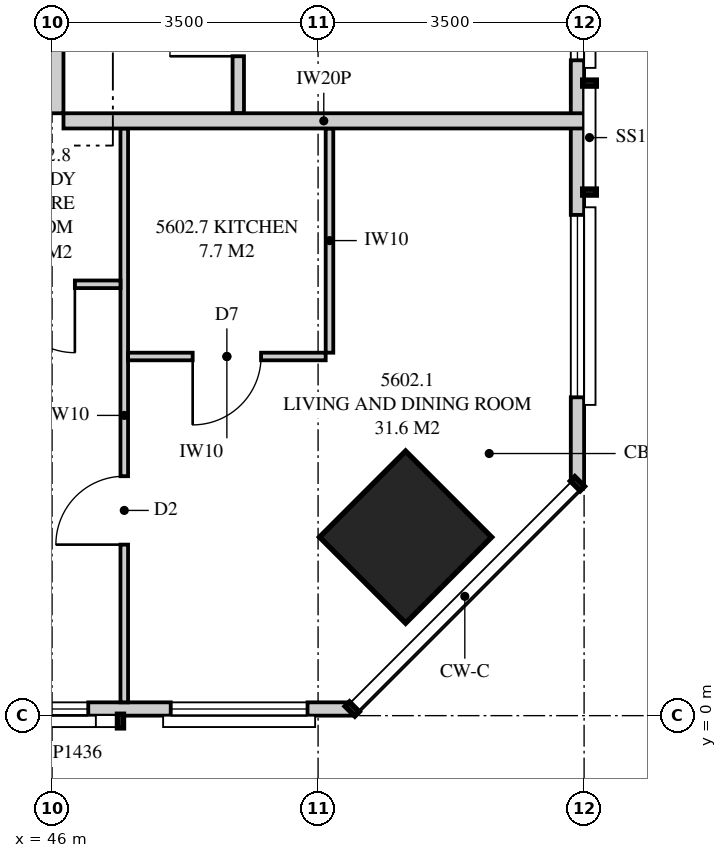
"""IFC4 building model, lengths in metres.
Left out: names, types, materials, properties, quantities, classifications, styles, units other than length and angle.
Written with IfcOpenShell. Run it as: python <this file> out.ifc"""

import sys

from ifc_helpers import new_model, si_unit, direction, frame, frame_2d, origin, origin_2d, place, context, subcontext, project, spatial, polyline, rectangle, hollow_rectangle, outline, extrude, element, fill, save


model = new_model("IFC4")
c1 = context("Model", 3, precision=1e-05, world=origin(), true_north=direction((0.0, 1.0)))
c2 = subcontext(c1, "Body", "Model", "MODEL_VIEW")
j1 = project(units=[si_unit("LENGTHUNIT", "METRE"), si_unit("PLANEANGLEUNIT", "RADIAN")], contexts=[c1])
p1 = place(None, origin())
s1 = spatial("IfcSite", under=j1, at=p1, CompositionType="ELEMENT")
p2 = place(p1, origin())
s2 = spatial("IfcBuilding", under=s1, at=p2, CompositionType="ELEMENT")
p3 = place(p2, frame((0.0, 0.0, 204.6)))
s3 = spatial("IfcBuildingStorey", under=s2, at=p3, CompositionType="ELEMENT", Elevation=204.6)
p4 = place(p3, frame((50.652, 2.348, 0.0), z_axis=(0.0, 0.0, 1.0), x_axis=(-0.707106781187, 0.707106781187, 0.0)))
e1 = element("IfcColumn", 1, at=p4, inside=s3, PredefinedType="COLUMN", context=c2, shape_type="SweptSolid", body=[
    extrude(hollow_rectangle(XDim=1.6, YDim=1.6, WallThickness=0.125, at=origin_2d()), origin(), (0.0, 0.0, 1.0), 3.35),
])
p5 = place(p3, frame((15.051, 0.087, 0.0), z_axis=(0.0, 0.0, 1.0), x_axis=(1.0, 0.0, 0.0)))
e2 = element("IfcWall", 2, at=p5, inside=s3, PredefinedType="SOLIDWALL", context=c2, shape_type="SweptSolid", body=[
    extrude(rectangle(XDim=34.897, YDim=0.175, at=frame_2d((17.449, 0.0))), origin(), (0.0, 0.0, 1.0), 3.07),
])
p6 = place(p5, frame((0.699, 0.0, 0.4)))
e3 = element("IfcOpeningElement", 3, at=p6, cuts=e2, PredefinedType="OPENING", context=c2, shape_type="SweptSolid", body=[
    extrude(rectangle(XDim=1.8, YDim=1.7, at=frame_2d((0.9, 0.85))), frame((0.0, 0.097, 0.0), z_axis=(0.0, -1.0, 0.0), x_axis=(1.0, 0.0, 0.0)), (0.0, 0.0, 1.0), 0.195),
])
p7 = place(p5, frame((9.274, 0.0, 0.4)))
e4 = element("IfcOpeningElement", 4, at=p7, cuts=e2, PredefinedType="OPENING", context=c2, shape_type="SweptSolid", body=[
    extrude(rectangle(XDim=2.4, YDim=1.7, at=frame_2d((1.2, 0.85))), frame((0.0, 0.097, 0.0), z_axis=(0.0, -1.0, 0.0), x_axis=(1.0, 0.0, 0.0)), (0.0, 0.0, 1.0), 0.195),
])
p8 = place(p5, frame((13.561, 0.0, 0.0)))
e5 = element("IfcOpeningElement", 5, at=p8, cuts=e2, PredefinedType="OPENING", context=c2, shape_type="SweptSolid", body=[
    extrude(rectangle(XDim=1.8, YDim=2.1, at=frame_2d((0.9, 1.05))), frame((0.0, 0.097, 0.0), z_axis=(0.0, -1.0, 0.0), x_axis=(1.0, 0.0, 0.0)), (0.0, 0.0, 1.0), 0.195),
])
p9 = place(p5, frame((20.049, 0.0, 0.4)))
e6 = element("IfcOpeningElement", 6, at=p9, cuts=e2, PredefinedType="OPENING", context=c2, shape_type="SweptSolid", body=[
    extrude(rectangle(XDim=1.8, YDim=1.7, at=frame_2d((0.9, 0.85))), frame((0.0, 0.097, 0.0), z_axis=(0.0, -1.0, 0.0), x_axis=(1.0, 0.0, 0.0)), (0.0, 0.0, 1.0), 0.195),
])
p10 = place(p5, frame((23.649, 0.0, 0.4)))
e7 = element("IfcOpeningElement", 7, at=p10, cuts=e2, PredefinedType="OPENING", context=c2, shape_type="SweptSolid", body=[
    extrude(rectangle(XDim=1.8, YDim=1.7, at=frame_2d((0.9, 0.85))), frame((0.0, 0.097, 0.0), z_axis=(0.0, -1.0, 0.0), x_axis=(1.0, 0.0, 0.0)), (0.0, 0.0, 1.0), 0.195),
])
p11 = place(p5, frame((29.625, 0.0, 0.4)))
e8 = element("IfcOpeningElement", 8, at=p11, cuts=e2, PredefinedType="OPENING", context=c2, shape_type="SweptSolid", body=[
    extrude(rectangle(XDim=1.8, YDim=1.7, at=frame_2d((0.9, 0.85))), frame((0.0, 0.097, 0.0), z_axis=(0.0, -1.0, 0.0), x_axis=(1.0, 0.0, 0.0)), (0.0, 0.0, 1.0), 0.195),
])
p12 = place(p5, frame((32.51, 0.0, 0.4)))
e9 = element("IfcOpeningElement", 9, at=p12, cuts=e2, PredefinedType="OPENING", context=c2, shape_type="SweptSolid", body=[
    extrude(rectangle(XDim=1.8, YDim=1.7, at=frame_2d((0.9, 0.85))), frame((0.0, 0.097, 0.0), z_axis=(0.0, -1.0, 0.0), x_axis=(1.0, 0.0, 0.0)), (0.0, 0.0, 1.0), 0.195),
])
p13 = place(p3, frame((52.913, 3.051, 0.0), z_axis=(0.0, 0.0, 1.0), x_axis=(0.0, 1.0, 0.0)))
e10 = element("IfcWall", 10, at=p13, inside=s3, PredefinedType="SOLIDWALL", context=c2, shape_type="SweptSolid", body=[
    extrude(outline(polyline([(0.0, 0.0), (29.897, 0.0), (29.897, 3.07), (19.763, 3.07), (19.763, 3.01), (19.617, 3.07), (0.0, 3.07), (0.0, 0.0)])), frame((0.0, 0.087, 0.0), z_axis=(0.0, -1.0, 0.0), x_axis=(1.0, 0.0, 0.0)), (0.0, 0.0, 1.0), 0.175),
])
p14 = place(p13, frame((1.137, 0.0, 0.4)))
e11 = element("IfcOpeningElement", 11, at=p14, cuts=e10, PredefinedType="OPENING", context=c2, shape_type="SweptSolid", body=[
    extrude(rectangle(XDim=2.4, YDim=1.7, at=frame_2d((1.2, 0.85))), frame((0.0, 0.097, 0.0), z_axis=(0.0, -1.0, 0.0), x_axis=(1.0, 0.0, 0.0)), (0.0, 0.0, 1.0), 0.195),
])
p15 = place(p13, frame((5.571, 0.0, 0.4)))
e12 = element("IfcOpeningElement", 12, at=p15, cuts=e10, PredefinedType="OPENING", context=c2, shape_type="SweptSolid", body=[
    extrude(rectangle(XDim=2.4, YDim=1.7, at=frame_2d((1.2, 0.85))), frame((0.0, 0.097, 0.0), z_axis=(0.0, -1.0, 0.0), x_axis=(1.0, 0.0, 0.0)), (0.0, 0.0, 1.0), 0.195),
])
p16 = place(p13, frame((11.879, 0.0, 0.4)))
e13 = element("IfcOpeningElement", 13, at=p16, cuts=e10, PredefinedType="OPENING", context=c2, shape_type="SweptSolid", body=[
    extrude(rectangle(XDim=1.8, YDim=1.7, at=frame_2d((0.9, 0.85))), frame((0.0, 0.097, 0.0), z_axis=(0.0, -1.0, 0.0), x_axis=(1.0, 0.0, 0.0)), (0.0, 0.0, 1.0), 0.195),
])
p17 = place(p13, frame((15.324, 0.0, 0.0)))
e14 = element("IfcOpeningElement", 14, at=p17, cuts=e10, PredefinedType="OPENING", context=c2, shape_type="SweptSolid", body=[
    extrude(rectangle(XDim=1.8, YDim=2.1, at=frame_2d((0.9, 1.05))), frame((0.0, 0.097, 0.0), z_axis=(0.0, -1.0, 0.0), x_axis=(1.0, 0.0, 0.0)), (0.0, 0.0, 1.0), 0.195),
])
p18 = place(p13, frame((18.224, 0.0, 0.4)))
e15 = element("IfcOpeningElement", 15, at=p18, cuts=e10, PredefinedType="OPENING", context=c2, shape_type="SweptSolid", body=[
    extrude(rectangle(XDim=1.8, YDim=1.7, at=frame_2d((0.9, 0.85))), frame((0.0, 0.097, 0.0), z_axis=(0.0, -1.0, 0.0), x_axis=(1.0, 0.0, 0.0)), (0.0, 0.0, 1.0), 0.195),
])
p19 = place(p13, frame((27.461, 0.0, 0.4)))
e16 = element("IfcOpeningElement", 16, at=p19, cuts=e10, PredefinedType="OPENING", context=c2, shape_type="SweptSolid", body=[
    extrude(rectangle(XDim=1.2, YDim=1.7, at=frame_2d((0.6, 0.85))), frame((0.0, 0.097, 0.0), z_axis=(0.0, -1.0, 0.0), x_axis=(1.0, 0.0, 0.0)), (0.0, 0.0, 1.0), 0.195),
])
p20 = place(p3, frame((46.95, 0.175, 0.0), z_axis=(0.0, 0.0, 1.0), x_axis=(0.0, 1.0, 0.0)))
e17 = element("IfcWall", 17, at=p20, inside=s3, PredefinedType="PARTITIONING", context=c2, shape_type="SweptSolid", body=[
    extrude(outline(polyline([(0.0, 0.0), (7.55, 0.0), (7.55, 3.07), (2.035, 3.07), (2.035, 2.07), (1.002, 2.07), (1.002, 3.07), (0.0, 3.07), (0.0, 0.0)])), frame((0.0, 0.05, 0.0), z_axis=(0.0, -1.0, 0.0), x_axis=(1.0, 0.0, 0.0)), (0.0, 0.0, 1.0), 0.1),
])
p21 = place(p20, frame((2.075, 0.0, 0.0)))
e18 = element("IfcOpeningElement", 18, at=p21, cuts=e17, PredefinedType="OPENING", context=c2, shape_type="SweptSolid", body=[
    extrude(rectangle(XDim=0.9, YDim=2.1, at=frame_2d((0.45, 1.05))), frame((0.0, 0.06, 0.0), z_axis=(0.0, -1.0, 0.0), x_axis=(1.0, 0.0, 0.0)), (0.0, 0.0, 1.0), 0.12),
])
p22 = place(p3, frame((47.0, 4.725, 0.0), z_axis=(0.0, 0.0, 1.0), x_axis=(1.0, 0.0, 0.0)))
e19 = element("IfcWall", 19, at=p22, inside=s3, PredefinedType="PARTITIONING", context=c2, shape_type="SweptSolid", body=[
    extrude(rectangle(XDim=2.6, YDim=0.1, at=frame_2d((1.3, 0.0))), origin(), (0.0, 0.0, 1.0), 3.07),
])
p23 = place(p22, frame((0.85, 0.0, 0.0)))
e20 = element("IfcOpeningElement", 20, at=p23, cuts=e19, PredefinedType="OPENING", context=c2, shape_type="SweptSolid", body=[
    extrude(rectangle(XDim=0.9, YDim=2.1, at=frame_2d((0.45, 1.05))), frame((0.0, 0.06, 0.0), z_axis=(0.0, -1.0, 0.0), x_axis=(1.0, 0.0, 0.0)), (0.0, 0.0, 1.0), 0.12),
])
p24 = place(p3, frame((49.65, 4.775, 0.0), z_axis=(0.0, 0.0, 1.0), x_axis=(0.0, 1.0, 0.0)))
e21 = element("IfcWall", 21, at=p24, inside=s3, PredefinedType="PARTITIONING", context=c2, shape_type="SweptSolid", body=[
    extrude(rectangle(XDim=2.95, YDim=0.1, at=frame_2d((1.475, 0.0))), origin(), (0.0, 0.0, 1.0), 3.07),
])
p25 = place(p3, frame((46.15, 7.825, 0.0), z_axis=(0.0, 0.0, 1.0), x_axis=(1.0, 0.0, 0.0)))
e22 = element("IfcWall", 22, at=p25, inside=s3, PredefinedType="PARTITIONING", context=c2, shape_type="SweptSolid", body=[
    extrude(outline(polyline([(0.0, 0.0), (6.85, 0.0), (6.85, 3.07), (5.738, 3.07), (5.738, 2.07), (4.703, 2.07), (4.703, 3.07), (0.0, 3.07), (0.0, 0.0)])), frame((0.0, 0.1, 0.0), z_axis=(0.0, -1.0, 0.0), x_axis=(1.0, 0.0, 0.0)), (0.0, 0.0, 1.0), 0.2),
])
p26 = place(p3, frame((46.05, 7.925, 0.0), z_axis=(0.0, 0.0, 1.0), x_axis=(0.0, 1.0, 0.0)))
e23 = element("IfcWall", 23, at=p26, inside=s3, PredefinedType="PARTITIONING", context=c2, shape_type="SweptSolid", body=[
    extrude(outline(polyline([(0.0, 0.0), (5.875, 0.0), (5.875, 3.07), (5.287, 3.07), (5.287, 2.595), (4.863, 2.595), (4.863, 3.07), (0.0, 3.07), (0.0, 0.0)])), frame((0.0, 0.1, 0.0), z_axis=(0.0, -1.0, 0.0), x_axis=(1.0, 0.0, 0.0)), (0.0, 0.0, 1.0), 0.2),
])
p27 = place(p26, frame((2.438, 0.0, 0.0)))
e24 = element("IfcOpeningElement", 24, at=p27, cuts=e23, PredefinedType="OPENING", context=c2, shape_type="SweptSolid", body=[
    extrude(rectangle(XDim=1.05, YDim=2.2, at=frame_2d((0.525, 1.1))), frame((0.0, 0.11, 0.0), z_axis=(0.0, -1.0, 0.0), x_axis=(1.0, 0.0, 0.0)), (0.0, 0.0, 1.0), 0.22),
])
p28 = place(p3, frame((48.45, 7.925, 0.0), z_axis=(0.0, 0.0, 1.0), x_axis=(0.0, 1.0, 0.0)))
e25 = element("IfcWall", 25, at=p28, inside=s3, PredefinedType="PLUMBINGWALL", context=c2, shape_type="SweptSolid", body=[
    extrude(rectangle(XDim=2.425, YDim=0.15, at=frame_2d((1.212, 0.0))), origin(), (0.0, 0.0, 1.0), 3.07),
])
p29 = place(p28, frame((0.75, 0.0, 0.0)))
e26 = element("IfcOpeningElement", 26, at=p29, cuts=e25, PredefinedType="OPENING", context=c2, shape_type="SweptSolid", body=[
    extrude(rectangle(XDim=0.9, YDim=2.1, at=frame_2d((0.45, 1.05))), frame((0.0, 0.085, 0.0), z_axis=(0.0, -1.0, 0.0), x_axis=(1.0, 0.0, 0.0)), (0.0, 0.0, 1.0), 0.17),
])
p30 = place(p3, frame((46.9, 5.675, 0.0), z_axis=(0.0, 0.0, 1.0), x_axis=(-1.0, 0.0, 0.0)))
e27 = element("IfcWall", 27, at=p30, inside=s3, PredefinedType="PARTITIONING", context=c2, shape_type="SweptSolid", body=[
    extrude(rectangle(XDim=2.1, YDim=0.1, at=frame_2d((1.05, 0.0))), origin(), (0.0, 0.0, 1.0), 3.07),
])
p31 = place(p30, frame((0.6, 0.0, 0.0)))
e28 = element("IfcOpeningElement", 28, at=p31, cuts=e27, PredefinedType="OPENING", context=c2, shape_type="SweptSolid", body=[
    extrude(rectangle(XDim=0.9, YDim=2.1, at=frame_2d((0.45, 1.05))), frame((0.0, 0.06, 0.0), z_axis=(0.0, -1.0, 0.0), x_axis=(1.0, 0.0, 0.0)), (0.0, 0.0, 1.0), 0.12),
])
p32 = place(p11, origin())
e29 = element("IfcWindow", 29, at=p32, inside=s3, PartitioningType="SINGLE_PANEL", PredefinedType="WINDOW", context=c2, shape_type="SweptSolid", body=[
    extrude(rectangle(XDim=1.8, YDim=1.7, at=frame_2d((0.9, 0.85))), frame((0.0, 0.03, 0.0), z_axis=(0.0, -1.0, 0.0), x_axis=(1.0, 0.0, 0.0)), (0.0, 0.0, 1.0), 0.06),
])
fill(e8, e29)
p33 = place(p12, origin())
e30 = element("IfcWindow", 30, at=p33, inside=s3, PartitioningType="SINGLE_PANEL", PredefinedType="WINDOW", context=c2, shape_type="SweptSolid", body=[
    extrude(rectangle(XDim=1.8, YDim=1.7, at=frame_2d((0.9, 0.85))), frame((0.0, 0.03, 0.0), z_axis=(0.0, -1.0, 0.0), x_axis=(1.0, 0.0, 0.0)), (0.0, 0.0, 1.0), 0.06),
])
fill(e9, e30)
p34 = place(p14, origin())
e31 = element("IfcWindow", 31, at=p34, inside=s3, PartitioningType="SINGLE_PANEL", PredefinedType="WINDOW", context=c2, shape_type="SweptSolid", body=[
    extrude(rectangle(XDim=2.4, YDim=1.7, at=frame_2d((1.2, 0.85))), frame((0.0, 0.03, 0.0), z_axis=(0.0, -1.0, 0.0), x_axis=(1.0, 0.0, 0.0)), (0.0, 0.0, 1.0), 0.06),
])
fill(e11, e31)
p35 = place(p15, origin())
e32 = element("IfcWindow", 32, at=p35, inside=s3, PartitioningType="SINGLE_PANEL", PredefinedType="WINDOW", context=c2, shape_type="SweptSolid", body=[
    extrude(rectangle(XDim=2.4, YDim=1.7, at=frame_2d((1.2, 0.85))), frame((0.0, 0.03, 0.0), z_axis=(0.0, -1.0, 0.0), x_axis=(1.0, 0.0, 0.0)), (0.0, 0.0, 1.0), 0.06),
])
fill(e12, e32)
p36 = place(p21, origin())
e33 = element("IfcDoor", 33, at=p36, inside=s3, OperationType="SINGLE_SWING_LEFT", PredefinedType="DOOR", context=c2, shape_type="SweptSolid", body=[
    extrude(rectangle(XDim=0.9, YDim=2.1, at=frame_2d((0.45, 1.05))), frame((0.0, 0.025, 0.0), z_axis=(0.0, -1.0, 0.0), x_axis=(1.0, 0.0, 0.0)), (0.0, 0.0, 1.0), 0.05),
])
fill(e18, e33)
p37 = place(p23, frame((0.9, 0.0, 0.0), z_axis=(0.0, 0.0, 1.0), x_axis=(-1.0, 0.0, 0.0)))
e34 = element("IfcDoor", 34, at=p37, inside=s3, OperationType="SINGLE_SWING_RIGHT", PredefinedType="DOOR", context=c2, shape_type="SweptSolid", body=[
    extrude(rectangle(XDim=0.9, YDim=2.1, at=frame_2d((0.45, 1.05))), frame((0.0, 0.025, 0.0), z_axis=(0.0, -1.0, 0.0), x_axis=(1.0, 0.0, 0.0)), (0.0, 0.0, 1.0), 0.05),
])
fill(e20, e34)
p38 = place(p29, origin())
e35 = element("IfcDoor", 35, at=p38, inside=s3, OperationType="SINGLE_SWING_LEFT", PredefinedType="DOOR", context=c2, shape_type="SweptSolid", body=[
    extrude(rectangle(XDim=0.9, YDim=2.1, at=frame_2d((0.45, 1.05))), frame((0.0, 0.025, 0.0), z_axis=(0.0, -1.0, 0.0), x_axis=(1.0, 0.0, 0.0)), (0.0, 0.0, 1.0), 0.05),
])
fill(e26, e35)
p39 = place(p31, origin())
e36 = element("IfcDoor", 36, at=p39, inside=s3, OperationType="SINGLE_SWING_LEFT", PredefinedType="DOOR", context=c2, shape_type="SweptSolid", body=[
    extrude(rectangle(XDim=0.9, YDim=2.1, at=frame_2d((0.45, 1.05))), frame((0.0, 0.025, 0.0), z_axis=(0.0, -1.0, 0.0), x_axis=(1.0, 0.0, 0.0)), (0.0, 0.0, 1.0), 0.05),
])
fill(e28, e36)
save(model, sys.argv[1])
